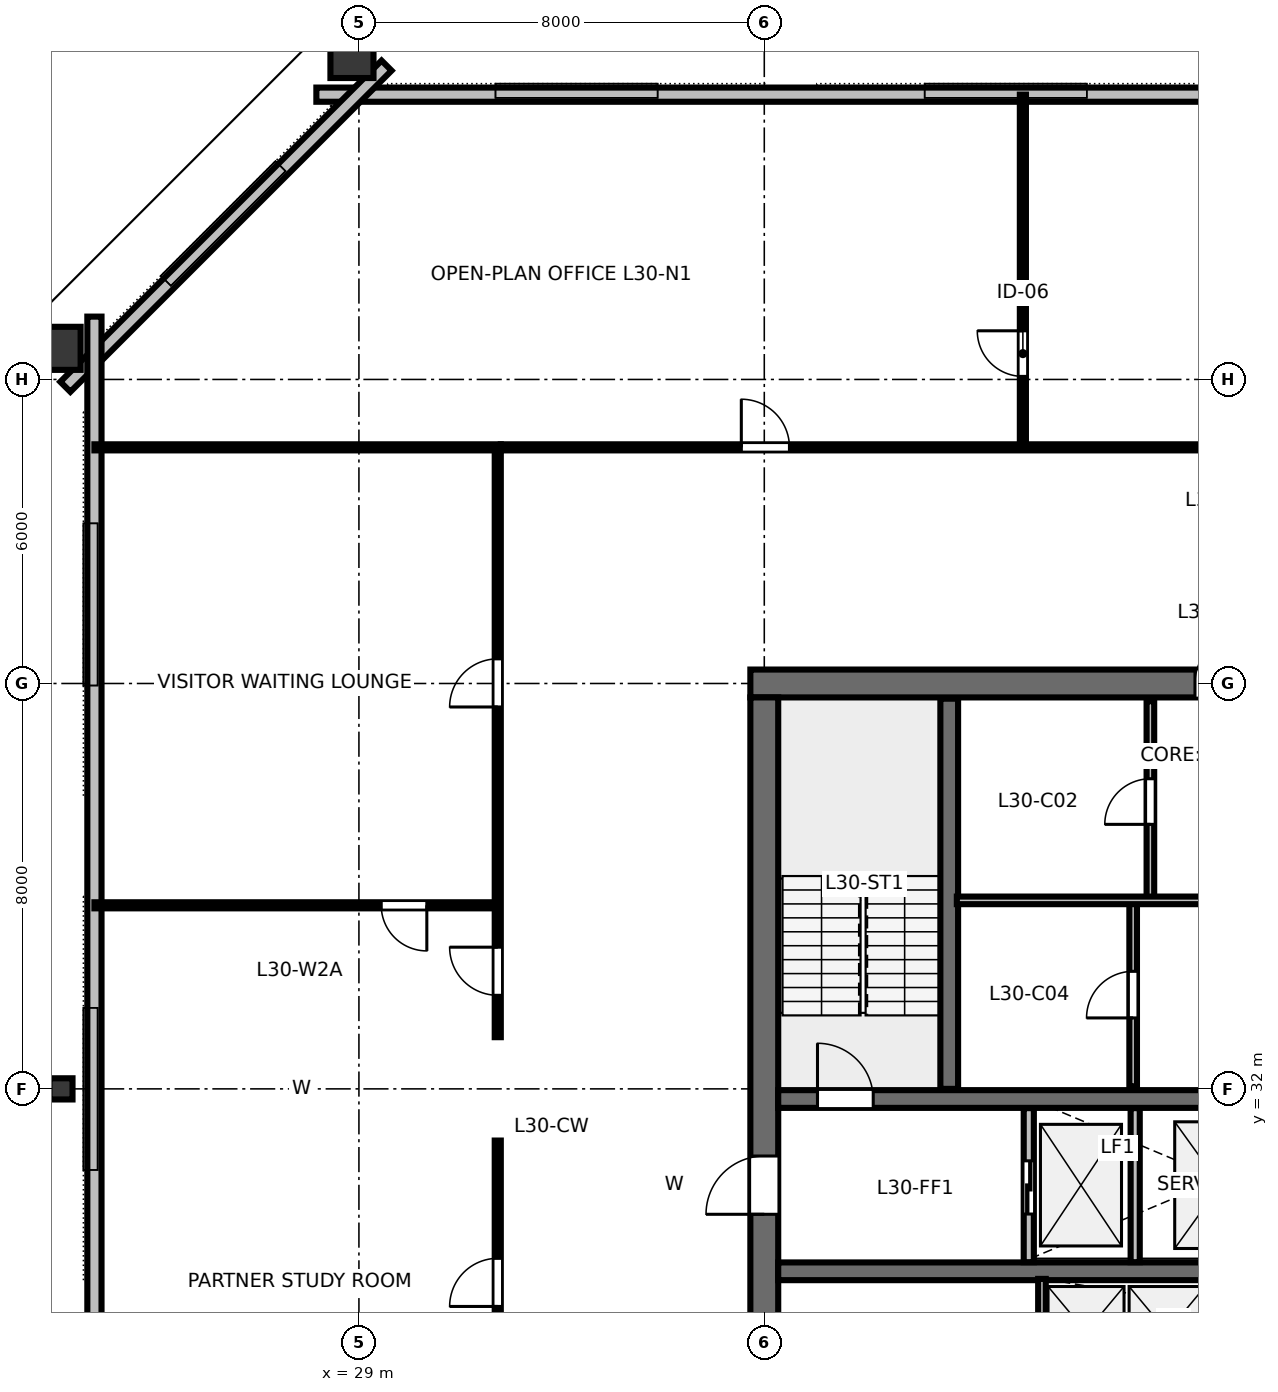
"""IFC4 building model, lengths in metres.
Left out: names, types, materials, properties, quantities, classifications, styles, units other than length and angle.
Written with IfcOpenShell. Run it as: python <this file> out.ifc"""

import sys

from ifc_helpers import new_model, si_unit, direction, frame, frame_2d, origin, origin_2d, place, context, subcontext, project, spatial, rectangle, hollow_rectangle, i_section, extrude, element, fill, save


model = new_model("IFC4")
c1 = context("Model", 3, precision=1e-05, world=origin(), true_north=direction((0.0, 1.0)))
c2 = subcontext(c1, "Body", "Model", "MODEL_VIEW")
j1 = project(units=[si_unit("LENGTHUNIT", "METRE"), si_unit("PLANEANGLEUNIT", "RADIAN")], contexts=[c1])
p1 = place(None, origin())
s1 = spatial("IfcSite", under=j1, at=p1, CompositionType="ELEMENT")
p2 = place(p1, origin())
s2 = spatial("IfcBuilding", under=s1, at=p2, CompositionType="ELEMENT")
p3 = place(p2, frame((0.0, 0.0, 116.8)))
s3 = spatial("IfcBuildingStorey", under=s2, at=p3, CompositionType="ELEMENT", Elevation=116.8)
p4 = place(p3, frame((36.725, 40.0, 0.0), z_axis=(0.0, 0.0, 1.0), x_axis=(1.0, 0.0, 0.0)))
e1 = element("IfcWall", 1, at=p4, inside=s3, PredefinedType="SHEAR", context=c2, shape_type="SweptSolid", body=[
    extrude(rectangle(XDim=18.55, YDim=0.55, at=frame_2d((9.275, 0.0))), origin(), (0.0, 0.0, 1.0), 3.36),
])
p5 = place(p4, frame((8.775, 0.0, 0.0)))
e2 = element("IfcOpeningElement", 2, at=p5, cuts=e1, PredefinedType="OPENING", context=c2, shape_type="SweptSolid", body=[
    extrude(rectangle(XDim=1.0, YDim=2.15, at=frame_2d((0.5, 1.075))), frame((0.0, 0.285, 0.0), z_axis=(0.0, -1.0, 0.0), x_axis=(1.0, 0.0, 0.0)), (0.0, 0.0, 1.0), 0.57),
])
p6 = place(p3, frame((37.0, 24.275, 0.0), z_axis=(0.0, 0.0, 1.0), x_axis=(0.0, 1.0, 0.0)))
e3 = element("IfcWall", 3, at=p6, inside=s3, PredefinedType="SHEAR", context=c2, shape_type="SweptSolid", body=[
    extrude(rectangle(XDim=15.45, YDim=0.55, at=frame_2d((7.725, 0.0))), origin(), (0.0, 0.0, 1.0), 3.36),
])
p7 = place(p6, frame((5.25, 0.0, 0.0)))
e4 = element("IfcOpeningElement", 4, at=p7, cuts=e3, PredefinedType="OPENING", context=c2, shape_type="SweptSolid", body=[
    extrude(rectangle(XDim=1.15, YDim=2.15, at=frame_2d((0.575, 1.075))), frame((0.0, 0.285, 0.0), z_axis=(0.0, -1.0, 0.0), x_axis=(1.0, 0.0, 0.0)), (0.0, 0.0, 1.0), 0.57),
])
p8 = place(p3, frame((37.275, 31.8, 0.0), z_axis=(0.0, 0.0, 1.0), x_axis=(1.0, 0.0, 0.0)))
e5 = element("IfcWall", 5, at=p8, inside=s3, PredefinedType="SHEAR", context=c2, shape_type="SweptSolid", body=[
    extrude(rectangle(XDim=17.45, YDim=0.35, at=frame_2d((8.725, 0.0))), origin(), (0.0, 0.0, 1.0), 3.36),
])
p9 = place(p8, frame((0.775, 0.0, 0.0)))
e6 = element("IfcOpeningElement", 6, at=p9, cuts=e5, PredefinedType="OPENING", context=c2, shape_type="SweptSolid", body=[
    extrude(rectangle(XDim=1.1, YDim=2.15, at=frame_2d((0.55, 1.075))), frame((0.0, 0.185, 0.0), z_axis=(0.0, -1.0, 0.0), x_axis=(1.0, 0.0, 0.0)), (0.0, 0.0, 1.0), 0.37),
])
p10 = place(p8, frame((14.675, 0.0, 0.0)))
e7 = element("IfcOpeningElement", 7, at=p10, cuts=e5, PredefinedType="OPENING", context=c2, shape_type="SweptSolid", body=[
    extrude(rectangle(XDim=1.1, YDim=2.15, at=frame_2d((0.55, 1.075))), frame((0.0, 0.185, 0.0), z_axis=(0.0, -1.0, 0.0), x_axis=(1.0, 0.0, 0.0)), (0.0, 0.0, 1.0), 0.37),
])
p11 = place(p3, frame((37.275, 28.4, 0.0), z_axis=(0.0, 0.0, 1.0), x_axis=(1.0, 0.0, 0.0)))
e8 = element("IfcWall", 8, at=p11, inside=s3, PredefinedType="SHEAR", context=c2, shape_type="SweptSolid", body=[
    extrude(rectangle(XDim=17.45, YDim=0.35, at=frame_2d((8.725, 0.0))), origin(), (0.0, 0.0, 1.0), 3.36),
])
for number, where, z_axis, x_axis in (
    (9, (28.863, 52.448, 0.0), (0.0, 0.0, 1.0), (1.0, 0.0, 0.0)),
    (10, (23.008, 46.614, 0.0), (0.0, 0.0, 1.0), (0.0, 1.0, 0.0)),
):
    element("IfcColumn", number, at=place(p3, frame(where, z_axis=z_axis, x_axis=x_axis)), inside=s3, PredefinedType="COLUMN", context=c2, shape_type="SweptSolid", body=[
        extrude(hollow_rectangle(XDim=0.85, YDim=1.0, WallThickness=0.05, at=origin_2d()), origin(), (0.0, 0.0, 1.0), 3.358),
    ])
p12 = place(p3, frame((23.12, 32.0, 0.0), z_axis=(0.0, 0.0, 1.0), x_axis=(0.0, 1.0, 0.0)))
e11 = element("IfcColumn", 11, at=p12, inside=s3, PredefinedType="COLUMN", context=c2, shape_type="SweptSolid", body=[
    extrude(i_section(OverallWidth=0.418, OverallDepth=0.455, WebThickness=0.042, FlangeThickness=0.068, FilletRadius=0.025, at=origin_2d()), origin(), (0.0, 0.0, 1.0), 3.358),
])
p13 = place(p3, frame((63.84, 51.62, 0.0), z_axis=(0.0, 0.0, 1.0), x_axis=(-1.0, 0.0, 0.0)))
e12 = element("IfcWall", 12, at=p13, inside=s3, PredefinedType="STANDARD", context=c2, shape_type="SweptSolid", body=[
    extrude(rectangle(XDim=35.68, YDim=0.28, at=frame_2d((17.84, 0.0))), origin(), (0.0, 0.0, 1.0), 3.36),
])
p14 = place(p3, frame((29.545, 52.194, 0.0), z_axis=(0.0, 0.0, 1.0), x_axis=(-0.707106781187, -0.707106781187, 0.0)))
e13 = element("IfcWall", 13, at=p14, inside=s3, PredefinedType="STANDARD", context=c2, shape_type="SweptSolid", body=[
    extrude(rectangle(XDim=8.965, YDim=0.28, at=frame_2d((4.482, 0.0))), origin(), (0.0, 0.0, 1.0), 3.36),
])
p15 = place(p3, frame((23.78, 47.24, 0.0), z_axis=(0.0, 0.0, 1.0), x_axis=(0.0, -1.0, 0.0)))
e14 = element("IfcWall", 14, at=p15, inside=s3, PredefinedType="STANDARD", context=c2, shape_type="SweptSolid", body=[
    extrude(rectangle(XDim=30.48, YDim=0.28, at=frame_2d((15.24, 0.0))), origin(), (0.0, 0.0, 1.0), 3.36),
])
p16 = place(p3, frame((40.65, 32.0, 0.0), z_axis=(0.0, 0.0, 1.0), x_axis=(0.0, 1.0, 0.0)))
e15 = element("IfcWall", 15, at=p16, inside=s3, PredefinedType="SHEAR", context=c2, shape_type="SweptSolid", body=[
    extrude(rectangle(XDim=7.7, YDim=0.35, at=frame_2d((3.85, 0.0))), origin(), (0.0, 0.0, 1.0), 3.6),
])
p17 = place(p3, frame((44.62, 35.72, 0.0), z_axis=(0.0, 0.0, 1.0), x_axis=(0.0, 1.0, 0.0)))
e16 = element("IfcWall", 16, at=p17, inside=s3, PredefinedType="PARTITIONING", context=c2, shape_type="SweptSolid", body=[
    extrude(rectangle(XDim=3.93, YDim=0.15, at=frame_2d((1.965, 0.0))), origin(), (0.0, 0.0, 1.0), 3.36),
])
p18 = place(p17, frame((1.5, 0.0, 0.0)))
e17 = element("IfcOpeningElement", 17, at=p18, cuts=e16, PredefinedType="OPENING", context=c2, shape_type="SweptSolid", body=[
    extrude(rectangle(XDim=0.9, YDim=2.15, at=frame_2d((0.45, 1.075))), frame((0.0, 0.085, 0.0), z_axis=(0.0, -1.0, 0.0), x_axis=(1.0, 0.0, 0.0)), (0.0, 0.0, 1.0), 0.17),
])
p19 = place(p3, frame((44.28, 32.05, 0.0), z_axis=(0.0, 0.0, 1.0), x_axis=(0.0, 1.0, 0.0)))
e18 = element("IfcWall", 18, at=p19, inside=s3, PredefinedType="PARTITIONING", context=c2, shape_type="SweptSolid", body=[
    extrude(rectangle(XDim=3.67, YDim=0.15, at=frame_2d((1.835, 0.0))), origin(), (0.0, 0.0, 1.0), 3.36),
])
p20 = place(p19, frame((1.35, 0.0, 0.0)))
e19 = element("IfcOpeningElement", 19, at=p20, cuts=e18, PredefinedType="OPENING", context=c2, shape_type="SweptSolid", body=[
    extrude(rectangle(XDim=0.92, YDim=2.15, at=frame_2d((0.46, 1.075))), frame((0.0, 0.085, 0.0), z_axis=(0.0, -1.0, 0.0), x_axis=(1.0, 0.0, 0.0)), (0.0, 0.0, 1.0), 0.17),
])
p21 = place(p3, frame((40.8, 35.72, 0.0), z_axis=(0.0, 0.0, 1.0), x_axis=(1.0, 0.0, 0.0)))
e20 = element("IfcWall", 20, at=p21, inside=s3, PredefinedType="PARTITIONING", context=c2, shape_type="SweptSolid", body=[
    extrude(rectangle(XDim=10.4, YDim=0.15, at=frame_2d((5.2, 0.0))), origin(), (0.0, 0.0, 1.0), 3.36),
])
p22 = place(p21, frame((4.9, 0.0, 0.0)))
e21 = element("IfcOpeningElement", 21, at=p22, cuts=e20, PredefinedType="OPENING", context=c2, shape_type="SweptSolid", body=[
    extrude(rectangle(XDim=0.9, YDim=2.15, at=frame_2d((0.45, 1.075))), frame((0.0, 0.085, 0.0), z_axis=(0.0, -1.0, 0.0), x_axis=(1.0, 0.0, 0.0)), (0.0, 0.0, 1.0), 0.17),
])
p23 = place(p3, frame((42.22, 28.58, 0.0), z_axis=(0.0, 0.0, 1.0), x_axis=(0.0, 1.0, 0.0)))
e22 = element("IfcWall", 22, at=p23, inside=s3, PredefinedType="PARTITIONING", context=c2, shape_type="SweptSolid", body=[
    extrude(rectangle(XDim=3.04, YDim=0.2, at=frame_2d((1.52, 0.0))), origin(), (0.0, 0.0, 1.0), 3.36),
])
p24 = place(p23, frame((0.95, 0.0, 0.0)))
e23 = element("IfcOpeningElement", 23, at=p24, cuts=e22, PredefinedType="OPENING", context=c2, shape_type="SweptSolid", body=[
    extrude(rectangle(XDim=1.05, YDim=2.15, at=frame_2d((0.525, 1.075))), frame((0.0, 0.11, 0.0), z_axis=(0.0, -1.0, 0.0), x_axis=(1.0, 0.0, 0.0)), (0.0, 0.0, 1.0), 0.22),
])
p25 = place(p3, frame((44.32, 28.58, 0.0), z_axis=(0.0, 0.0, 1.0), x_axis=(0.0, 1.0, 0.0)))
e24 = element("IfcWall", 24, at=p25, inside=s3, PredefinedType="PARTITIONING", context=c2, shape_type="SweptSolid", body=[
    extrude(rectangle(XDim=3.04, YDim=0.18, at=frame_2d((1.52, 0.0))), origin(), (0.0, 0.0, 1.0), 3.36),
])
p26 = place(p3, frame((42.48, 24.35, 0.0), z_axis=(0.0, 0.0, 1.0), x_axis=(0.0, 1.0, 0.0)))
e25 = element("IfcWall", 25, at=p26, inside=s3, PredefinedType="PARTITIONING", context=c2, shape_type="SweptSolid", body=[
    extrude(rectangle(XDim=3.9, YDim=0.15, at=frame_2d((1.95, 0.0))), origin(), (0.0, 0.0, 1.0), 3.36),
])
p27 = place(p26, frame((0.35, 0.0, 0.0)))
e26 = element("IfcOpeningElement", 26, at=p27, cuts=e25, PredefinedType="OPENING", context=c2, shape_type="SweptSolid", body=[
    extrude(rectangle(XDim=0.9, YDim=2.15, at=frame_2d((0.45, 1.075))), frame((0.0, 0.085, 0.0), z_axis=(0.0, -1.0, 0.0), x_axis=(1.0, 0.0, 0.0)), (0.0, 0.0, 1.0), 0.17),
])
p28 = place(p3, frame((42.104, 44.66, 0.0), z_axis=(0.0, 0.0, 1.0), x_axis=(0.0, 1.0, 0.0)))
e27 = element("IfcWall", 27, at=p28, inside=s3, PredefinedType="PARTITIONING", context=c2, shape_type="SweptSolid", body=[
    extrude(rectangle(XDim=6.96, YDim=0.12, at=frame_2d((3.48, 0.0))), origin(), (0.0, 0.0, 1.0), 2.64),
])
p29 = place(p28, frame((1.4, 0.0, 0.0)))
e28 = element("IfcOpeningElement", 28, at=p29, cuts=e27, PredefinedType="OPENING", context=c2, shape_type="SweptSolid", body=[
    extrude(rectangle(XDim=0.9, YDim=2.15, at=frame_2d((0.45, 1.075))), frame((0.0, 0.07, 0.0), z_axis=(0.0, -1.0, 0.0), x_axis=(1.0, 0.0, 0.0)), (0.0, 0.0, 1.0), 0.14),
])
p30 = place(p3, frame((31.8, 44.66, 0.0), z_axis=(0.0, 0.0, 1.0), x_axis=(1.0, 0.0, 0.0)))
e29 = element("IfcWall", 29, at=p30, inside=s3, PredefinedType="PARTITIONING", context=c2, shape_type="SweptSolid", body=[
    extrude(rectangle(XDim=28.4, YDim=0.12, at=frame_2d((14.2, 0.0))), origin(), (0.0, 0.0, 1.0), 2.64),
])
p31 = place(p30, frame((4.747, 0.0, 0.0)))
e30 = element("IfcOpeningElement", 30, at=p31, cuts=e29, PredefinedType="OPENING", context=c2, shape_type="SweptSolid", body=[
    extrude(rectangle(XDim=0.95, YDim=2.15, at=frame_2d((0.475, 1.075))), frame((0.0, 0.07, 0.0), z_axis=(0.0, -1.0, 0.0), x_axis=(1.0, 0.0, 0.0)), (0.0, 0.0, 1.0), 0.14),
])
p32 = place(p30, frame((18.807, 0.0, 0.0)))
e31 = element("IfcOpeningElement", 31, at=p32, cuts=e29, PredefinedType="OPENING", context=c2, shape_type="SweptSolid", body=[
    extrude(rectangle(XDim=0.95, YDim=2.15, at=frame_2d((0.475, 1.075))), frame((0.0, 0.07, 0.0), z_axis=(0.0, -1.0, 0.0), x_axis=(1.0, 0.0, 0.0)), (0.0, 0.0, 1.0), 0.14),
])
p33 = place(p3, frame((31.74, 35.623, 0.0), z_axis=(0.0, 0.0, 1.0), x_axis=(-1.0, 0.0, 0.0)))
e32 = element("IfcWall", 32, at=p33, inside=s3, PredefinedType="PARTITIONING", context=c2, shape_type="SweptSolid", body=[
    extrude(rectangle(XDim=7.96, YDim=0.12, at=frame_2d((3.98, 0.0))), origin(), (0.0, 0.0, 1.0), 2.64),
])
p34 = place(p33, frame((1.4, 0.0, 0.0)))
e33 = element("IfcOpeningElement", 33, at=p34, cuts=e32, PredefinedType="OPENING", context=c2, shape_type="SweptSolid", body=[
    extrude(rectangle(XDim=0.9, YDim=2.15, at=frame_2d((0.45, 1.075))), frame((0.0, 0.07, 0.0), z_axis=(0.0, -1.0, 0.0), x_axis=(1.0, 0.0, 0.0)), (0.0, 0.0, 1.0), 0.14),
])
p35 = place(p3, frame((31.74, 19.4, 0.0), z_axis=(0.0, 0.0, 1.0), x_axis=(0.0, 1.0, 0.0)))
e34 = element("IfcWall", 34, at=p35, inside=s3, PredefinedType="PARTITIONING", context=c2, shape_type="SweptSolid", body=[
    extrude(rectangle(XDim=11.58, YDim=0.12, at=frame_2d((5.79, 0.0))), origin(), (0.0, 0.0, 1.0), 2.64),
])
p36 = place(p35, frame((2.616, 0.0, 0.0)))
e35 = element("IfcOpeningElement", 35, at=p36, cuts=e34, PredefinedType="OPENING", context=c2, shape_type="SweptSolid", body=[
    extrude(rectangle(XDim=0.95, YDim=2.15, at=frame_2d((0.475, 1.075))), frame((0.0, 0.07, 0.0), z_axis=(0.0, -1.0, 0.0), x_axis=(1.0, 0.0, 0.0)), (0.0, 0.0, 1.0), 0.14),
])
p37 = place(p35, frame((8.306, 0.0, 0.0)))
e36 = element("IfcOpeningElement", 36, at=p37, cuts=e34, PredefinedType="OPENING", context=c2, shape_type="SweptSolid", body=[
    extrude(rectangle(XDim=0.95, YDim=2.15, at=frame_2d((0.475, 1.075))), frame((0.0, 0.07, 0.0), z_axis=(0.0, -1.0, 0.0), x_axis=(1.0, 0.0, 0.0)), (0.0, 0.0, 1.0), 0.14),
])
p38 = place(p3, frame((31.74, 33.02, 0.0), z_axis=(0.0, 0.0, 1.0), x_axis=(0.0, 1.0, 0.0)))
e37 = element("IfcWall", 37, at=p38, inside=s3, PredefinedType="PARTITIONING", context=c2, shape_type="SweptSolid", body=[
    extrude(rectangle(XDim=11.58, YDim=0.12, at=frame_2d((5.79, 0.0))), origin(), (0.0, 0.0, 1.0), 2.64),
])
p39 = place(p38, frame((0.826, 0.0, 0.0)))
e38 = element("IfcOpeningElement", 38, at=p39, cuts=e37, PredefinedType="OPENING", context=c2, shape_type="SweptSolid", body=[
    extrude(rectangle(XDim=0.95, YDim=2.15, at=frame_2d((0.475, 1.075))), frame((0.0, 0.07, 0.0), z_axis=(0.0, -1.0, 0.0), x_axis=(1.0, 0.0, 0.0)), (0.0, 0.0, 1.0), 0.14),
])
p40 = place(p38, frame((6.516, 0.0, 0.0)))
e39 = element("IfcOpeningElement", 39, at=p40, cuts=e37, PredefinedType="OPENING", context=c2, shape_type="SweptSolid", body=[
    extrude(rectangle(XDim=0.95, YDim=2.15, at=frame_2d((0.475, 1.075))), frame((0.0, 0.07, 0.0), z_axis=(0.0, -1.0, 0.0), x_axis=(1.0, 0.0, 0.0)), (0.0, 0.0, 1.0), 0.14),
])
p41 = place(p3, frame((31.8, 44.66, 0.0), z_axis=(0.0, 0.0, 1.0), x_axis=(-1.0, 0.0, 0.0)))
e40 = element("IfcWall", 40, at=p41, inside=s3, PredefinedType="PARTITIONING", context=c2, shape_type="SweptSolid", body=[
    extrude(rectangle(XDim=8.02, YDim=0.12, at=frame_2d((4.01, 0.0))), origin(), (0.0, 0.0, 1.0), 2.64),
])
p42 = place(p9, origin())
e41 = element("IfcDoor", 41, at=p42, inside=s3, OperationType="SINGLE_SWING_LEFT", PredefinedType="DOOR", context=c2, shape_type="SweptSolid", body=[
    extrude(rectangle(XDim=1.1, YDim=2.15, at=frame_2d((0.55, 1.075))), frame((0.0, 0.025, 0.0), z_axis=(0.0, -1.0, 0.0), x_axis=(1.0, 0.0, 0.0)), (0.0, 0.0, 1.0), 0.05),
])
fill(e6, e41)
p43 = place(p5, origin())
e42 = element("IfcDoor", 42, at=p43, inside=s3, OperationType="SINGLE_SWING_RIGHT", PredefinedType="DOOR", context=c2, shape_type="SweptSolid", body=[
    extrude(rectangle(XDim=1.0, YDim=2.15, at=frame_2d((0.5, 1.075))), frame((0.0, 0.025, 0.0), z_axis=(0.0, -1.0, 0.0), x_axis=(1.0, 0.0, 0.0)), (0.0, 0.0, 1.0), 0.05),
])
fill(e2, e42)
p44 = place(p7, origin())
e43 = element("IfcDoor", 43, at=p44, inside=s3, OperationType="SINGLE_SWING_LEFT", PredefinedType="DOOR", context=c2, shape_type="SweptSolid", body=[
    extrude(rectangle(XDim=1.15, YDim=2.15, at=frame_2d((0.575, 1.075))), frame((0.0, 0.025, 0.0), z_axis=(0.0, -1.0, 0.0), x_axis=(1.0, 0.0, 0.0)), (0.0, 0.0, 1.0), 0.05),
])
fill(e4, e43)
p45 = place(p18, origin())
e44 = element("IfcDoor", 44, at=p45, inside=s3, OperationType="SINGLE_SWING_LEFT", PredefinedType="DOOR", context=c2, shape_type="SweptSolid", body=[
    extrude(rectangle(XDim=0.9, YDim=2.15, at=frame_2d((0.45, 1.075))), frame((0.0, 0.025, 0.0), z_axis=(0.0, -1.0, 0.0), x_axis=(1.0, 0.0, 0.0)), (0.0, 0.0, 1.0), 0.05),
])
fill(e17, e44)
p46 = place(p20, origin())
e45 = element("IfcDoor", 45, at=p46, inside=s3, OperationType="SINGLE_SWING_LEFT", PredefinedType="DOOR", context=c2, shape_type="SweptSolid", body=[
    extrude(rectangle(XDim=0.92, YDim=2.15, at=frame_2d((0.46, 1.075))), frame((0.0, 0.025, 0.0), z_axis=(0.0, -1.0, 0.0), x_axis=(1.0, 0.0, 0.0)), (0.0, 0.0, 1.0), 0.05),
])
fill(e19, e45)
p47 = place(p24, origin())
e46 = element("IfcDoor", 46, at=p47, inside=s3, OperationType="SLIDING_TO_LEFT", PredefinedType="DOOR", context=c2, shape_type="SweptSolid", body=[
    extrude(rectangle(XDim=1.05, YDim=2.15, at=frame_2d((0.525, 1.075))), frame((0.0, 0.025, 0.0), z_axis=(0.0, -1.0, 0.0), x_axis=(1.0, 0.0, 0.0)), (0.0, 0.0, 1.0), 0.05),
])
fill(e23, e46)
p48 = place(p29, origin())
e47 = element("IfcDoor", 47, at=p48, inside=s3, OperationType="SINGLE_SWING_RIGHT", PredefinedType="DOOR", context=c2, shape_type="SweptSolid", body=[
    extrude(rectangle(XDim=0.9, YDim=2.15, at=frame_2d((0.45, 1.075))), frame((0.0, 0.025, 0.0), z_axis=(0.0, -1.0, 0.0), x_axis=(1.0, 0.0, 0.0)), (0.0, 0.0, 1.0), 0.05),
])
fill(e28, e47)
p49 = place(p31, origin())
e48 = element("IfcDoor", 48, at=p49, inside=s3, OperationType="SINGLE_SWING_LEFT", PredefinedType="DOOR", context=c2, shape_type="SweptSolid", body=[
    extrude(rectangle(XDim=0.95, YDim=2.15, at=frame_2d((0.475, 1.075))), frame((0.0, 0.025, 0.0), z_axis=(0.0, -1.0, 0.0), x_axis=(1.0, 0.0, 0.0)), (0.0, 0.0, 1.0), 0.05),
])
fill(e30, e48)
p50 = place(p34, origin())
e49 = element("IfcDoor", 49, at=p50, inside=s3, OperationType="SINGLE_SWING_LEFT", PredefinedType="DOOR", context=c2, shape_type="SweptSolid", body=[
    extrude(rectangle(XDim=0.9, YDim=2.15, at=frame_2d((0.45, 1.075))), frame((0.0, 0.025, 0.0), z_axis=(0.0, -1.0, 0.0), x_axis=(1.0, 0.0, 0.0)), (0.0, 0.0, 1.0), 0.05),
])
fill(e33, e49)
p51 = place(p37, origin())
e50 = element("IfcDoor", 50, at=p51, inside=s3, OperationType="SINGLE_SWING_LEFT", PredefinedType="DOOR", context=c2, shape_type="SweptSolid", body=[
    extrude(rectangle(XDim=0.95, YDim=2.15, at=frame_2d((0.475, 1.075))), frame((0.0, 0.025, 0.0), z_axis=(0.0, -1.0, 0.0), x_axis=(1.0, 0.0, 0.0)), (0.0, 0.0, 1.0), 0.05),
])
fill(e36, e50)
p52 = place(p39, origin())
e51 = element("IfcDoor", 51, at=p52, inside=s3, OperationType="SINGLE_SWING_RIGHT", PredefinedType="DOOR", context=c2, shape_type="SweptSolid", body=[
    extrude(rectangle(XDim=0.95, YDim=2.15, at=frame_2d((0.475, 1.075))), frame((0.0, 0.025, 0.0), z_axis=(0.0, -1.0, 0.0), x_axis=(1.0, 0.0, 0.0)), (0.0, 0.0, 1.0), 0.05),
])
fill(e38, e51)
p53 = place(p40, origin())
e52 = element("IfcDoor", 52, at=p53, inside=s3, OperationType="SINGLE_SWING_LEFT", PredefinedType="DOOR", context=c2, shape_type="SweptSolid", body=[
    extrude(rectangle(XDim=0.95, YDim=2.15, at=frame_2d((0.475, 1.075))), frame((0.0, 0.025, 0.0), z_axis=(0.0, -1.0, 0.0), x_axis=(1.0, 0.0, 0.0)), (0.0, 0.0, 1.0), 0.05),
])
fill(e39, e52)
save(model, sys.argv[1])
